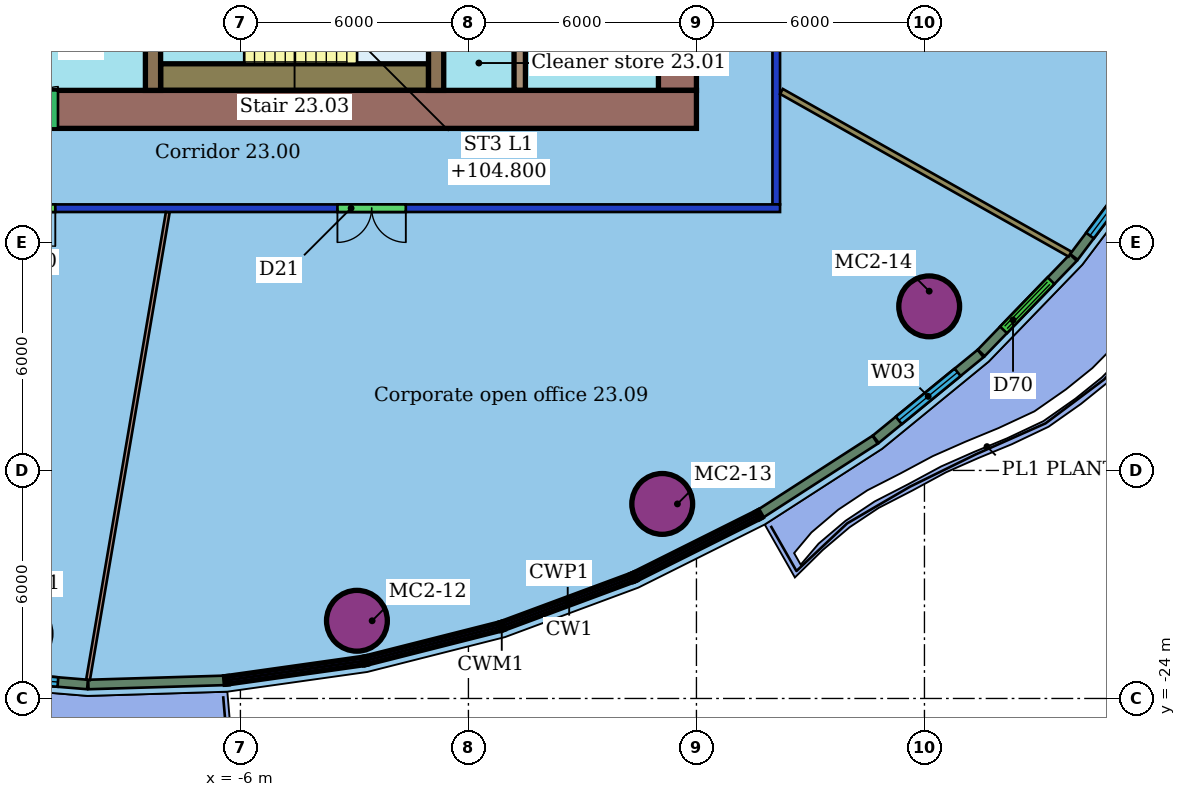
"""IFC4 building model, lengths in metres.
Left out: names, types, materials, properties, quantities, classifications, styles, units other than length and angle.
Written with IfcOpenShell. Run it as: python <this file> out.ifc"""

import sys

from ifc_helpers import new_model, si_unit, direction, frame, frame_2d, origin, origin_2d, place, context, subcontext, project, spatial, rectangle, hollow_circle, extrude, element, fill, save


model = new_model("IFC4")
c1 = context("Model", 3, precision=1e-05, world=origin(), true_north=direction((0.0, 1.0)))
c2 = subcontext(c1, "Body", "Model", "MODEL_VIEW")
j1 = project(units=[si_unit("LENGTHUNIT", "METRE"), si_unit("PLANEANGLEUNIT", "RADIAN")], contexts=[c1])
p1 = place(None, origin())
s1 = spatial("IfcSite", under=j1, at=p1, CompositionType="ELEMENT")
p2 = place(p1, origin())
s2 = spatial("IfcBuilding", under=s1, at=p2, CompositionType="ELEMENT")
p3 = place(p2, frame((0.0, 0.0, 103.0)))
s3 = spatial("IfcBuildingStorey", under=s2, at=p3, CompositionType="ELEMENT", Elevation=103.0)
for number, where, z_axis, x_axis in (
    (1, (-2.934, -21.956, 0.0), (0.0, 0.0, 1.0), (1.0, 0.0, 0.0)),
    (2, (5.1, -18.881, 0.0), (0.0, 0.0, 1.0), (1.0, 0.0, 0.0)),
    (3, (12.125, -13.683, 0.0), (0.0, 0.0, 1.0), (1.0, 0.0, 0.0)),
):
    element("IfcColumn", number, at=place(p3, frame(where, z_axis=z_axis, x_axis=x_axis)), inside=s3, PredefinedType="COLUMN", context=c2, shape_type="SweptSolid", body=[
        extrude(hollow_circle(Radius=0.8, WallThickness=0.055, at=origin_2d()), origin(), (0.0, 0.0, 1.0), 3.45),
    ])
p4 = place(p3, frame((8.2, -11.1, 0.0), z_axis=(0.0, 0.0, 1.0), x_axis=(-1.0, 0.0, 0.0)))
e4 = element("IfcWall", 4, at=p4, inside=s3, PredefinedType="PARTITIONING", context=c2, shape_type="SweptSolid", body=[
    extrude(rectangle(XDim=28.4, YDim=0.2, at=frame_2d((14.2, 0.0))), origin(), (0.0, 0.0, 1.0), 3.0),
])
p5 = place(p4, frame((19.071, 0.0, 0.0)))
e5 = element("IfcOpeningElement", 5, at=p5, cuts=e4, PredefinedType="OPENING", context=c2, shape_type="SweptSolid", body=[
    extrude(rectangle(XDim=1.0, YDim=2.1, at=frame_2d((0.5, 1.05))), frame((0.0, 0.11, 0.0), z_axis=(0.0, -1.0, 0.0), x_axis=(1.0, 0.0, 0.0)), (0.0, 0.0, 1.0), 0.22),
])
p6 = place(p4, frame((9.847, 0.0, 0.0)))
e6 = element("IfcOpeningElement", 6, at=p6, cuts=e4, PredefinedType="OPENING", context=c2, shape_type="SweptSolid", body=[
    extrude(rectangle(XDim=1.8, YDim=2.1, at=frame_2d((0.9, 1.05))), frame((0.0, 0.11, 0.0), z_axis=(0.0, -1.0, 0.0), x_axis=(1.0, 0.0, 0.0)), (0.0, 0.0, 1.0), 0.22),
])
p7 = place(p3, frame((8.1, 11.0, 0.0), z_axis=(0.0, 0.0, 1.0), x_axis=(0.0, -1.0, 0.0)))
e7 = element("IfcWall", 7, at=p7, inside=s3, PredefinedType="PARTITIONING", context=c2, shape_type="SweptSolid", body=[
    extrude(rectangle(XDim=22.0, YDim=0.2, at=frame_2d((11.0, 0.0))), origin(), (0.0, 0.0, 1.0), 3.0),
])
p8 = place(p7, frame((14.499, 0.0, 0.0)))
e8 = element("IfcOpeningElement", 8, at=p8, cuts=e7, PredefinedType="OPENING", context=c2, shape_type="SweptSolid", body=[
    extrude(rectangle(XDim=1.5, YDim=2.1, at=frame_2d((0.75, 1.05))), frame((0.0, 0.11, 0.0), z_axis=(0.0, -1.0, 0.0), x_axis=(1.0, 0.0, 0.0)), (0.0, 0.0, 1.0), 0.22),
])
p9 = place(p7, frame((6.92, 0.0, 0.0)))
e9 = element("IfcOpeningElement", 9, at=p9, cuts=e7, PredefinedType="OPENING", context=c2, shape_type="SweptSolid", body=[
    extrude(rectangle(XDim=1.8, YDim=2.1, at=frame_2d((0.9, 1.05))), frame((0.0, 0.11, 0.0), z_axis=(0.0, -1.0, 0.0), x_axis=(1.0, 0.0, 0.0)), (0.0, 0.0, 1.0), 0.22),
])
p10 = place(p3, frame((-10.01, -23.508, 0.0), z_axis=(0.0, 0.0, 1.0), x_axis=(0.168138794108, 0.985763331594, 0.0)))
e10 = element("IfcWall", 10, at=p10, inside=s3, PredefinedType="PARTITIONING", context=c2, shape_type="SweptSolid", body=[
    extrude(rectangle(XDim=12.477, YDim=0.1, at=frame_2d((6.239, 0.0))), origin(), (0.0, 0.0, 1.0), 3.45),
])
p11 = place(p3, frame((15.831, -12.31, 0.0), z_axis=(0.0, 0.0, 1.0), x_axis=(-0.871068786754, 0.491161041556, 0.0)))
e11 = element("IfcWall", 11, at=p11, inside=s3, PredefinedType="PARTITIONING", context=c2, shape_type="SweptSolid", body=[
    extrude(rectangle(XDim=8.719, YDim=0.15, at=frame_2d((4.359, 0.0))), origin(), (0.0, 0.0, 1.0), 3.45),
])
p12 = place(p3, frame((-13.575, -23.339, 0.0), z_axis=(0.0, 0.0, 1.0), x_axis=(0.996602699612, -0.082359329318, 0.0)))
e12 = element("IfcWall", 12, at=p12, inside=s3, PredefinedType="SOLIDWALL", context=c2, shape_type="SweptSolid", body=[
    extrude(rectangle(XDim=3.563, YDim=0.25, at=frame_2d((1.782, 0.0))), origin(), (0.0, 0.0, 1.0), 3.05),
])
p13 = place(p12, frame((0.781, 0.0, 0.9)))
e13 = element("IfcOpeningElement", 13, at=p13, cuts=e12, PredefinedType="OPENING", context=c2, shape_type="SweptSolid", body=[
    extrude(rectangle(XDim=2.0, YDim=2.1, at=frame_2d((1.0, 1.05))), frame((0.0, 0.135, 0.0), z_axis=(0.0, -1.0, 0.0), x_axis=(1.0, 0.0, 0.0)), (0.0, 0.0, 1.0), 0.27),
])
p14 = place(p3, frame((-10.002, -23.633, 0.0), z_axis=(0.0, 0.0, 1.0), x_axis=(0.999541179145, 0.030289126641, 0.0)))
e14 = element("IfcWall", 14, at=p14, inside=s3, PredefinedType="SOLIDWALL", context=c2, shape_type="SweptSolid", body=[
    extrude(rectangle(XDim=3.579, YDim=0.25, at=frame_2d((1.79, 0.0))), origin(), (0.0, 0.0, 1.0), 3.05),
])
p15 = place(p3, frame((7.694, -19.132, 0.0), z_axis=(0.0, 0.0, 1.0), x_axis=(0.840361806694, 0.542025860869, 0.0)))
e15 = element("IfcWall", 15, at=p15, inside=s3, PredefinedType="SOLIDWALL", context=c2, shape_type="SweptSolid", body=[
    extrude(rectangle(XDim=3.579, YDim=0.25, at=frame_2d((1.789, 0.0))), origin(), (0.0, 0.0, 1.0), 3.05),
])
p16 = place(p3, frame((10.719, -17.179, 0.0), z_axis=(0.0, 0.0, 1.0), x_axis=(0.774030565645, 0.633148231813, 0.0)))
e16 = element("IfcWall", 16, at=p16, inside=s3, PredefinedType="SOLIDWALL", context=c2, shape_type="SweptSolid", body=[
    extrude(rectangle(XDim=3.563, YDim=0.25, at=frame_2d((1.781, 0.0))), origin(), (0.0, 0.0, 1.0), 3.05),
])
p17 = place(p16, frame((0.781, 0.0, 0.9)))
e17 = element("IfcOpeningElement", 17, at=p17, cuts=e16, PredefinedType="OPENING", context=c2, shape_type="SweptSolid", body=[
    extrude(rectangle(XDim=2.0, YDim=2.1, at=frame_2d((1.0, 1.05))), frame((0.0, 0.135, 0.0), z_axis=(0.0, -1.0, 0.0), x_axis=(1.0, 0.0, 0.0)), (0.0, 0.0, 1.0), 0.27),
])
p18 = place(p3, frame((13.494, -14.908, 0.0), z_axis=(0.0, 0.0, 1.0), x_axis=(0.694896677822, 0.719109593283, 0.0)))
e18 = element("IfcWall", 18, at=p18, inside=s3, PredefinedType="SOLIDWALL", context=c2, shape_type="SweptSolid", body=[
    extrude(rectangle(XDim=3.489, YDim=0.25, at=frame_2d((1.744, 0.0))), origin(), (0.0, 0.0, 1.0), 3.05),
])
p19 = place(p18, frame((0.844, 0.0, 0.0)))
e19 = element("IfcOpeningElement", 19, at=p19, cuts=e18, PredefinedType="OPENING", context=c2, shape_type="SweptSolid", body=[
    extrude(rectangle(XDim=1.8, YDim=2.4, at=frame_2d((0.9, 1.2))), frame((0.0, 0.135, 0.0), z_axis=(0.0, -1.0, 0.0), x_axis=(1.0, 0.0, 0.0)), (0.0, 0.0, 1.0), 0.27),
])
p20 = place(p3, frame((15.933, -12.382, 0.0), z_axis=(0.0, 0.0, 1.0), x_axis=(0.602098174714, 0.798422061322, 0.0)))
e20 = element("IfcWall", 20, at=p20, inside=s3, PredefinedType="SOLIDWALL", context=c2, shape_type="SweptSolid", body=[
    extrude(rectangle(XDim=3.404, YDim=0.25, at=frame_2d((1.702, 0.0))), origin(), (0.0, 0.0, 1.0), 3.05),
])
p21 = place(p20, frame((0.702, 0.0, 0.9)))
e21 = element("IfcOpeningElement", 21, at=p21, cuts=e20, PredefinedType="OPENING", context=c2, shape_type="SweptSolid", body=[
    extrude(rectangle(XDim=2.0, YDim=2.1, at=frame_2d((1.0, 1.05))), frame((0.0, 0.135, 0.0), z_axis=(0.0, -1.0, 0.0), x_axis=(1.0, 0.0, 0.0)), (0.0, 0.0, 1.0), 0.27),
])
p22 = place(p3, frame((-18.0, -8.5, 0.0), z_axis=(0.0, 0.0, 1.0), x_axis=(1.0, 0.0, 0.0)))
e22 = element("IfcWall", 22, at=p22, inside=s3, PredefinedType="SHEAR", context=c2, shape_type="SweptSolid", body=[
    extrude(rectangle(XDim=24.0, YDim=1.0, at=frame_2d((12.0, 0.0))), origin(), (0.0, 0.0, 1.0), 3.3),
])
p23 = place(p22, frame((6.0, 0.0, 0.0)))
e23 = element("IfcOpeningElement", 23, at=p23, cuts=e22, PredefinedType="OPENING", context=c2, shape_type="SweptSolid", body=[
    extrude(rectangle(XDim=1.2, YDim=2.1, at=frame_2d((0.6, 1.05))), frame((0.0, 0.51, 0.0), z_axis=(0.0, -1.0, 0.0), x_axis=(1.0, 0.0, 0.0)), (0.0, 0.0, 1.0), 1.02),
])
p24 = place(p3, frame((5.5, -8.0, 0.0), z_axis=(0.0, 0.0, 1.0), x_axis=(0.0, 1.0, 0.0)))
e24 = element("IfcWall", 24, at=p24, inside=s3, PredefinedType="SHEAR", context=c2, shape_type="SweptSolid", body=[
    extrude(rectangle(XDim=16.0, YDim=1.0, at=frame_2d((8.0, 0.0))), origin(), (0.0, 0.0, 1.0), 3.3),
])
p25 = place(p24, frame((2.9, 0.0, 0.0)))
e25 = element("IfcOpeningElement", 25, at=p25, cuts=e24, PredefinedType="OPENING", context=c2, shape_type="SweptSolid", body=[
    extrude(rectangle(XDim=1.2, YDim=2.1, at=frame_2d((0.6, 1.05))), frame((0.0, 0.51, 0.0), z_axis=(0.0, -1.0, 0.0), x_axis=(1.0, 0.0, 0.0)), (0.0, 0.0, 1.0), 1.02),
])
p26 = place(p24, frame((11.9, 0.0, 0.0)))
e26 = element("IfcOpeningElement", 26, at=p26, cuts=e24, PredefinedType="OPENING", context=c2, shape_type="SweptSolid", body=[
    extrude(rectangle(XDim=1.2, YDim=2.1, at=frame_2d((0.6, 1.05))), frame((0.0, 0.51, 0.0), z_axis=(0.0, -1.0, 0.0), x_axis=(1.0, 0.0, 0.0)), (0.0, 0.0, 1.0), 1.02),
])
p27 = place(p3, frame((1.35, -8.0, 0.0), z_axis=(0.0, 0.0, 1.0), x_axis=(0.0, 1.0, 0.0)))
e27 = element("IfcWall", 27, at=p27, inside=s3, PredefinedType="SHEAR", context=c2, shape_type="SweptSolid", body=[
    extrude(rectangle(XDim=16.0, YDim=0.3, at=frame_2d((8.0, 0.0))), origin(), (0.0, 0.0, 1.0), 3.3),
])
p28 = place(p27, frame((1.91, 0.0, 0.0)))
e28 = element("IfcOpeningElement", 28, at=p28, cuts=e27, PredefinedType="OPENING", context=c2, shape_type="SweptSolid", body=[
    extrude(rectangle(XDim=1.0, YDim=2.1, at=frame_2d((0.5, 1.05))), frame((0.0, 0.16, 0.0), z_axis=(0.0, -1.0, 0.0), x_axis=(1.0, 0.0, 0.0)), (0.0, 0.0, 1.0), 0.32),
])
p29 = place(p27, frame((7.25, 0.0, 0.0)))
e29 = element("IfcOpeningElement", 29, at=p29, cuts=e27, PredefinedType="OPENING", context=c2, shape_type="SweptSolid", body=[
    extrude(rectangle(XDim=1.5, YDim=2.1, at=frame_2d((0.75, 1.05))), frame((0.0, 0.16, 0.0), z_axis=(0.0, -1.0, 0.0), x_axis=(1.0, 0.0, 0.0)), (0.0, 0.0, 1.0), 0.32),
])
p30 = place(p3, frame((-8.3, -3.88, 0.0), z_axis=(0.0, 0.0, 1.0), x_axis=(0.0, -1.0, 0.0)))
e30 = element("IfcWall", 30, at=p30, inside=s3, PredefinedType="SHEAR", context=c2, shape_type="SweptSolid", body=[
    extrude(rectangle(XDim=4.12, YDim=0.4, at=frame_2d((2.06, 0.0))), origin(), (0.0, 0.0, 1.0), 3.3),
])
p31 = place(p30, frame((1.11, 0.0, 0.0)))
e31 = element("IfcOpeningElement", 31, at=p31, cuts=e30, PredefinedType="OPENING", context=c2, shape_type="SweptSolid", body=[
    extrude(rectangle(XDim=1.2, YDim=2.1, at=frame_2d((0.6, 1.05))), frame((0.0, 0.21, 0.0), z_axis=(0.0, -1.0, 0.0), x_axis=(1.0, 0.0, 0.0)), (0.0, 0.0, 1.0), 0.42),
])
p32 = place(p3, frame((-0.85, -3.88, 0.0), z_axis=(0.0, 0.0, 1.0), x_axis=(0.0, -1.0, 0.0)))
e32 = element("IfcWall", 32, at=p32, inside=s3, PredefinedType="SHEAR", context=c2, shape_type="SweptSolid", body=[
    extrude(rectangle(XDim=4.12, YDim=0.4, at=frame_2d((2.06, 0.0))), origin(), (0.0, 0.0, 1.0), 3.3),
])
p33 = place(p3, frame((-8.1, -7.65, 0.0), z_axis=(0.0, 0.0, 1.0), x_axis=(1.0, 0.0, 0.0)))
e33 = element("IfcWall", 33, at=p33, inside=s3, PredefinedType="SHEAR", context=c2, shape_type="SweptSolid", body=[
    extrude(rectangle(XDim=7.05, YDim=0.7, at=frame_2d((3.525, 0.0))), origin(), (0.0, 0.0, 1.0), 3.3),
])
p34 = place(p5, origin())
e34 = element("IfcDoor", 34, at=p34, inside=s3, OperationType="SINGLE_SWING_LEFT", PredefinedType="DOOR", context=c2, shape_type="SweptSolid", body=[
    extrude(rectangle(XDim=1.0, YDim=2.1, at=frame_2d((0.5, 1.05))), frame((0.0, 0.025, 0.0), z_axis=(0.0, -1.0, 0.0), x_axis=(1.0, 0.0, 0.0)), (0.0, 0.0, 1.0), 0.05),
])
fill(e5, e34)
p35 = place(p6, origin())
e35 = element("IfcDoor", 35, at=p35, inside=s3, OperationType="DOUBLE_DOOR_SINGLE_SWING", PredefinedType="DOOR", context=c2, shape_type="SweptSolid", body=[
    extrude(rectangle(XDim=1.8, YDim=2.1, at=frame_2d((0.9, 1.05))), frame((0.0, 0.025, 0.0), z_axis=(0.0, -1.0, 0.0), x_axis=(1.0, 0.0, 0.0)), (0.0, 0.0, 1.0), 0.05),
])
fill(e6, e35)
p36 = place(p13, origin())
e36 = element("IfcWindow", 36, at=p36, inside=s3, PartitioningType="SINGLE_PANEL", PredefinedType="WINDOW", context=c2, shape_type="SweptSolid", body=[
    extrude(rectangle(XDim=2.0, YDim=2.1, at=frame_2d((1.0, 1.05))), frame((0.0, 0.03, 0.0), z_axis=(0.0, -1.0, 0.0), x_axis=(1.0, 0.0, 0.0)), (0.0, 0.0, 1.0), 0.06),
])
fill(e13, e36)
p37 = place(p17, origin())
e37 = element("IfcWindow", 37, at=p37, inside=s3, PartitioningType="SINGLE_PANEL", PredefinedType="WINDOW", context=c2, shape_type="SweptSolid", body=[
    extrude(rectangle(XDim=2.0, YDim=2.1, at=frame_2d((1.0, 1.05))), frame((0.0, 0.03, 0.0), z_axis=(0.0, -1.0, 0.0), x_axis=(1.0, 0.0, 0.0)), (0.0, 0.0, 1.0), 0.06),
])
fill(e17, e37)
p38 = place(p19, origin())
e38 = element("IfcDoor", 38, at=p38, inside=s3, OperationType="DOUBLE_DOOR_SLIDING", PredefinedType="DOOR", context=c2, shape_type="SweptSolid", body=[
    extrude(rectangle(XDim=1.8, YDim=2.4, at=frame_2d((0.9, 1.2))), frame((0.0, 0.025, 0.0), z_axis=(0.0, -1.0, 0.0), x_axis=(1.0, 0.0, 0.0)), (0.0, 0.0, 1.0), 0.05),
])
fill(e19, e38)
p39 = place(p21, origin())
e39 = element("IfcWindow", 39, at=p39, inside=s3, PartitioningType="SINGLE_PANEL", PredefinedType="WINDOW", context=c2, shape_type="SweptSolid", body=[
    extrude(rectangle(XDim=2.0, YDim=2.1, at=frame_2d((1.0, 1.05))), frame((0.0, 0.03, 0.0), z_axis=(0.0, -1.0, 0.0), x_axis=(1.0, 0.0, 0.0)), (0.0, 0.0, 1.0), 0.06),
])
fill(e21, e39)
p40 = place(p23, origin())
e40 = element("IfcDoor", 40, at=p40, inside=s3, OperationType="DOUBLE_DOOR_SINGLE_SWING", PredefinedType="NOTDEFINED", context=c2, shape_type="SweptSolid", body=[
    extrude(rectangle(XDim=1.2, YDim=2.1, at=frame_2d((0.6, 1.05))), frame((0.0, 0.025, 0.0), z_axis=(0.0, -1.0, 0.0), x_axis=(1.0, 0.0, 0.0)), (0.0, 0.0, 1.0), 0.05),
])
fill(e23, e40)
save(model, sys.argv[1])
